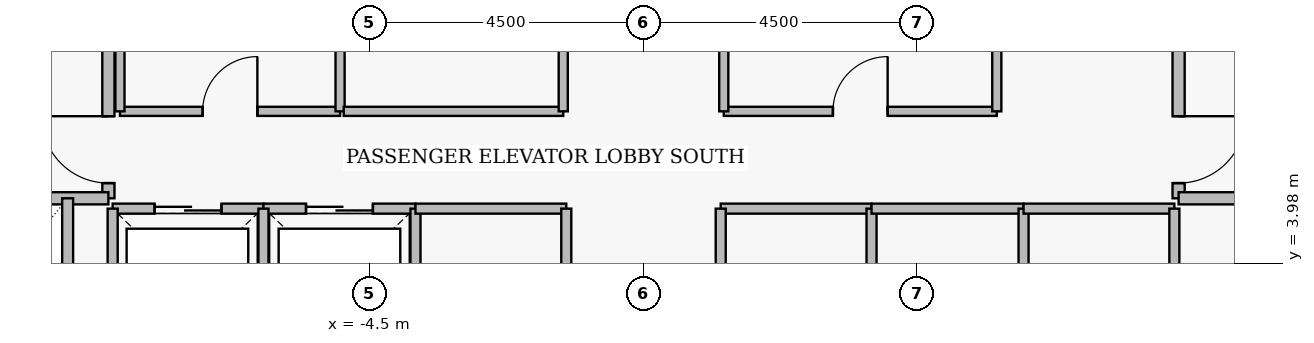
"""IFC4 building model, lengths in metres.
Left out: names, types, materials, properties, quantities, classifications, styles, units other than length and angle.
Written with IfcOpenShell. Run it as: python <this file> out.ifc"""

import sys

from ifc_helpers import new_model, si_unit, direction, frame, frame_2d, origin, place, context, subcontext, project, spatial, rectangle, extrude, element, fill, save


model = new_model("IFC4")
c1 = context("Model", 3, precision=1e-05, world=origin(), true_north=direction((0.0, 1.0)))
c2 = subcontext(c1, "Body", "Model", "MODEL_VIEW")
j1 = project(units=[si_unit("LENGTHUNIT", "METRE"), si_unit("PLANEANGLEUNIT", "RADIAN")], contexts=[c1])
p1 = place(None, origin())
s1 = spatial("IfcSite", under=j1, at=p1, CompositionType="ELEMENT")
p2 = place(p1, origin())
s2 = spatial("IfcBuilding", under=s1, at=p2, CompositionType="ELEMENT")
p3 = place(p2, frame((0.0, 0.0, -4.5)))
s3 = spatial("IfcBuildingStorey", under=s2, at=p3, CompositionType="ELEMENT", Elevation=-4.5)
p4 = place(p3, frame((-8.8, 5.05, 0.0), z_axis=(0.0, 0.0, 1.0), x_axis=(0.0, 1.0, 0.0)))
e1 = element("IfcWall", 1, at=p4, inside=s3, PredefinedType="PARTITIONING", context=c2, shape_type="SweptSolid", body=[
    extrude(rectangle(XDim=6.1, YDim=0.2, at=frame_2d((3.05, 0.0))), origin(), (0.0, 0.0, 1.0), 4.24),
])
p5 = place(p4, frame((0.25, 0.0, 0.0)))
e2 = element("IfcOpeningElement", 2, at=p5, cuts=e1, PredefinedType="OPENING", context=c2, shape_type="SweptSolid", body=[
    extrude(rectangle(XDim=1.1, YDim=2.2, at=frame_2d((0.55, 1.1))), frame((0.0, 0.11, 0.0), z_axis=(0.0, -1.0, 0.0), x_axis=(1.0, 0.0, 0.0)), (0.0, 0.0, 1.0), 0.22),
])
p6 = place(p4, frame((3.85, 0.0, 0.0)))
e3 = element("IfcOpeningElement", 3, at=p6, cuts=e1, PredefinedType="OPENING", context=c2, shape_type="SweptSolid", body=[
    extrude(rectangle(XDim=1.1, YDim=2.2, at=frame_2d((0.55, 1.1))), frame((0.0, 0.11, 0.0), z_axis=(0.0, -1.0, 0.0), x_axis=(1.0, 0.0, 0.0)), (0.0, 0.0, 1.0), 0.22),
])
p7 = place(p3, frame((8.8, 11.15, 0.0), z_axis=(0.0, 0.0, 1.0), x_axis=(0.0, -1.0, 0.0)))
e4 = element("IfcWall", 4, at=p7, inside=s3, PredefinedType="PARTITIONING", context=c2, shape_type="SweptSolid", body=[
    extrude(rectangle(XDim=6.1, YDim=0.2, at=frame_2d((3.05, 0.0))), origin(), (0.0, 0.0, 1.0), 4.24),
])
p8 = place(p7, frame((1.15, 0.0, 0.0)))
e5 = element("IfcOpeningElement", 5, at=p8, cuts=e4, PredefinedType="OPENING", context=c2, shape_type="SweptSolid", body=[
    extrude(rectangle(XDim=1.1, YDim=2.2, at=frame_2d((0.55, 1.1))), frame((0.0, 0.11, 0.0), z_axis=(0.0, -1.0, 0.0), x_axis=(1.0, 0.0, 0.0)), (0.0, 0.0, 1.0), 0.22),
])
p9 = place(p7, frame((4.75, 0.0, 0.0)))
e6 = element("IfcOpeningElement", 6, at=p9, cuts=e4, PredefinedType="OPENING", context=c2, shape_type="SweptSolid", body=[
    extrude(rectangle(XDim=1.1, YDim=2.2, at=frame_2d((0.55, 1.1))), frame((0.0, 0.11, 0.0), z_axis=(0.0, -1.0, 0.0), x_axis=(1.0, 0.0, 0.0)), (0.0, 0.0, 1.0), 0.22),
])
p10 = place(p3, frame((-8.73, 4.88, 0.0), z_axis=(0.0, 0.0, 1.0), x_axis=(1.0, 0.0, 0.0)))
e7 = element("IfcWall", 7, at=p10, inside=s3, PredefinedType="PARTITIONING", context=c2, shape_type="SweptSolid", body=[
    extrude(rectangle(XDim=2.48, YDim=0.165, at=frame_2d((1.24, 0.0))), origin(), (0.0, 0.0, 1.0), 4.24),
])
p11 = place(p10, frame((0.69, 0.0, 0.0)))
e8 = element("IfcOpeningElement", 8, at=p11, cuts=e7, PredefinedType="OPENING", context=c2, shape_type="SweptSolid", body=[
    extrude(rectangle(XDim=1.1, YDim=2.25, at=frame_2d((0.55, 1.125))), frame((0.0, 0.093, 0.0), z_axis=(0.0, -1.0, 0.0), x_axis=(1.0, 0.0, 0.0)), (0.0, 0.0, 1.0), 0.185),
])
p12 = place(p3, frame((-6.25, 4.88, 0.0), z_axis=(0.0, 0.0, 1.0), x_axis=(1.0, 0.0, 0.0)))
e9 = element("IfcWall", 9, at=p12, inside=s3, PredefinedType="PARTITIONING", context=c2, shape_type="SweptSolid", body=[
    extrude(rectangle(XDim=2.5, YDim=0.165, at=frame_2d((1.25, 0.0))), origin(), (0.0, 0.0, 1.0), 4.24),
])
p13 = place(p12, frame((0.7, 0.0, 0.0)))
e10 = element("IfcOpeningElement", 10, at=p13, cuts=e9, PredefinedType="OPENING", context=c2, shape_type="SweptSolid", body=[
    extrude(rectangle(XDim=1.1, YDim=2.25, at=frame_2d((0.55, 1.125))), frame((0.0, 0.093, 0.0), z_axis=(0.0, -1.0, 0.0), x_axis=(1.0, 0.0, 0.0)), (0.0, 0.0, 1.0), 0.185),
])
p14 = place(p3, frame((-8.61, 6.48, 0.0), z_axis=(0.0, 0.0, 1.0), x_axis=(1.0, 0.0, 0.0)))
e11 = element("IfcWall", 11, at=p14, inside=s3, PredefinedType="PARTITIONING", context=c2, shape_type="SweptSolid", body=[
    extrude(rectangle(XDim=3.62, YDim=0.15, at=frame_2d((1.81, 0.0))), origin(), (0.0, 0.0, 1.0), 4.24),
])
p15 = place(p14, frame((1.36, 0.0, 0.0)))
e12 = element("IfcOpeningElement", 12, at=p15, cuts=e11, PredefinedType="OPENING", context=c2, shape_type="SweptSolid", body=[
    extrude(rectangle(XDim=0.9, YDim=2.15, at=frame_2d((0.45, 1.075))), frame((0.0, 0.085, 0.0), z_axis=(0.0, -1.0, 0.0), x_axis=(1.0, 0.0, 0.0)), (0.0, 0.0, 1.0), 0.17),
])
p16 = place(p3, frame((1.32, 6.48, 0.0), z_axis=(0.0, 0.0, 1.0), x_axis=(1.0, 0.0, 0.0)))
e13 = element("IfcWall", 13, at=p16, inside=s3, PredefinedType="PARTITIONING", context=c2, shape_type="SweptSolid", body=[
    extrude(rectangle(XDim=4.49, YDim=0.15, at=frame_2d((2.245, 0.0))), origin(), (0.0, 0.0, 1.0), 4.24),
])
p17 = place(p16, frame((1.795, 0.0, 0.0)))
e14 = element("IfcOpeningElement", 14, at=p17, cuts=e13, PredefinedType="OPENING", context=c2, shape_type="SweptSolid", body=[
    extrude(rectangle(XDim=0.9, YDim=2.15, at=frame_2d((0.45, 1.075))), frame((0.0, 0.085, 0.0), z_axis=(0.0, -1.0, 0.0), x_axis=(1.0, 0.0, 0.0)), (0.0, 0.0, 1.0), 0.17),
])
for number, where, z_axis, x_axis in (
    (15, (-11.65, 5.05, 0.0), (0.0, 0.0, 1.0), (1.0, 0.0, 0.0)),
    (16, (8.8, 5.05, 0.0), (0.0, 0.0, 1.0), (1.0, 0.0, 0.0)),
):
    element("IfcWall", number, at=place(p3, frame(where, z_axis=z_axis, x_axis=x_axis)), inside=s3, PredefinedType="PARTITIONING", context=c2, shape_type="SweptSolid", body=[
        extrude(rectangle(XDim=2.85, YDim=0.2, at=frame_2d((1.425, 0.0))), origin(), (0.0, 0.0, 1.0), 4.24),
    ])
for number, where, z_axis, x_axis in (
    (17, (-8.73, 2.52, 0.0), (0.0, 0.0, 1.0), (0.0, 1.0, 0.0)),
    (18, (-6.25, 2.52, 0.0), (0.0, 0.0, 1.0), (0.0, 1.0, 0.0)),
    (19, (-3.75, 2.52, 0.0), (0.0, 0.0, 1.0), (0.0, 1.0, 0.0)),
):
    element("IfcWall", number, at=place(p3, frame(where, z_axis=z_axis, x_axis=x_axis)), inside=s3, PredefinedType="PARTITIONING", context=c2, shape_type="SweptSolid", body=[
        extrude(rectangle(XDim=2.36, YDim=0.165, at=frame_2d((1.18, 0.0))), origin(), (0.0, 0.0, 1.0), 4.24),
    ])
p18 = place(p3, frame((-3.75, 4.88, 0.0), z_axis=(0.0, 0.0, 1.0), x_axis=(1.0, 0.0, 0.0)))
e20 = element("IfcWall", 20, at=p18, inside=s3, PredefinedType="PARTITIONING", context=c2, shape_type="SweptSolid", body=[
    extrude(rectangle(XDim=2.48, YDim=0.165, at=frame_2d((1.24, 0.0))), origin(), (0.0, 0.0, 1.0), 4.24),
])
p19 = place(p3, frame((-1.27, 2.52, 0.0), z_axis=(0.0, 0.0, 1.0), x_axis=(0.0, 1.0, 0.0)))
e21 = element("IfcWall", 21, at=p19, inside=s3, PredefinedType="PARTITIONING", context=c2, shape_type="SweptSolid", body=[
    extrude(rectangle(XDim=2.36, YDim=0.165, at=frame_2d((1.18, 0.0))), origin(), (0.0, 0.0, 1.0), 4.24),
])
p20 = place(p3, frame((1.27, 4.88, 0.0), z_axis=(0.0, 0.0, 1.0), x_axis=(1.0, 0.0, 0.0)))
e22 = element("IfcWall", 22, at=p20, inside=s3, PredefinedType="PARTITIONING", context=c2, shape_type="SweptSolid", body=[
    extrude(rectangle(XDim=2.48, YDim=0.165, at=frame_2d((1.24, 0.0))), origin(), (0.0, 0.0, 1.0), 4.24),
])
for number, where, z_axis, x_axis in (
    (23, (1.27, 2.52, 0.0), (0.0, 0.0, 1.0), (0.0, 1.0, 0.0)),
    (24, (3.75, 2.52, 0.0), (0.0, 0.0, 1.0), (0.0, 1.0, 0.0)),
):
    element("IfcWall", number, at=place(p3, frame(where, z_axis=z_axis, x_axis=x_axis)), inside=s3, PredefinedType="PARTITIONING", context=c2, shape_type="SweptSolid", body=[
        extrude(rectangle(XDim=2.36, YDim=0.165, at=frame_2d((1.18, 0.0))), origin(), (0.0, 0.0, 1.0), 4.24),
    ])
p21 = place(p3, frame((3.75, 4.88, 0.0), z_axis=(0.0, 0.0, 1.0), x_axis=(1.0, 0.0, 0.0)))
e25 = element("IfcWall", 25, at=p21, inside=s3, PredefinedType="PARTITIONING", context=c2, shape_type="SweptSolid", body=[
    extrude(rectangle(XDim=2.5, YDim=0.165, at=frame_2d((1.25, 0.0))), origin(), (0.0, 0.0, 1.0), 4.24),
])
p22 = place(p3, frame((6.25, 2.52, 0.0), z_axis=(0.0, 0.0, 1.0), x_axis=(0.0, 1.0, 0.0)))
e26 = element("IfcWall", 26, at=p22, inside=s3, PredefinedType="PARTITIONING", context=c2, shape_type="SweptSolid", body=[
    extrude(rectangle(XDim=2.36, YDim=0.165, at=frame_2d((1.18, 0.0))), origin(), (0.0, 0.0, 1.0), 4.24),
])
p23 = place(p3, frame((6.25, 4.88, 0.0), z_axis=(0.0, 0.0, 1.0), x_axis=(1.0, 0.0, 0.0)))
e27 = element("IfcWall", 27, at=p23, inside=s3, PredefinedType="PARTITIONING", context=c2, shape_type="SweptSolid", body=[
    extrude(rectangle(XDim=2.48, YDim=0.165, at=frame_2d((1.24, 0.0))), origin(), (0.0, 0.0, 1.0), 4.24),
])
p24 = place(p3, frame((8.73, 2.52, 0.0), z_axis=(0.0, 0.0, 1.0), x_axis=(0.0, 1.0, 0.0)))
e28 = element("IfcWall", 28, at=p24, inside=s3, PredefinedType="PARTITIONING", context=c2, shape_type="SweptSolid", body=[
    extrude(rectangle(XDim=2.36, YDim=0.165, at=frame_2d((1.18, 0.0))), origin(), (0.0, 0.0, 1.0), 4.24),
])
p25 = place(p3, frame((-9.47, 2.45, 0.0), z_axis=(0.0, 0.0, 1.0), x_axis=(0.0, 1.0, 0.0)))
e29 = element("IfcWall", 29, at=p25, inside=s3, PredefinedType="PARTITIONING", context=c2, shape_type="SweptSolid", body=[
    extrude(rectangle(XDim=2.6, YDim=0.18, at=frame_2d((1.3, 0.0))), origin(), (0.0, 0.0, 1.0), 4.24),
])
for number, where, z_axis, x_axis in (
    (30, (-8.61, 6.48, 0.0), (0.0, 0.0, 1.0), (0.0, 1.0, 0.0)),
    (31, (-4.99, 6.48, 0.0), (0.0, 0.0, 1.0), (0.0, 1.0, 0.0)),
):
    element("IfcWall", number, at=place(p3, frame(where, z_axis=z_axis, x_axis=x_axis)), inside=s3, PredefinedType="PARTITIONING", context=c2, shape_type="SweptSolid", body=[
        extrude(rectangle(XDim=2.24, YDim=0.15, at=frame_2d((1.12, 0.0))), origin(), (0.0, 0.0, 1.0), 4.24),
    ])
p26 = place(p3, frame((-4.93, 6.48, 0.0), z_axis=(0.0, 0.0, 1.0), x_axis=(1.0, 0.0, 0.0)))
e32 = element("IfcWall", 32, at=p26, inside=s3, PredefinedType="PARTITIONING", context=c2, shape_type="SweptSolid", body=[
    extrude(rectangle(XDim=3.61, YDim=0.15, at=frame_2d((1.805, 0.0))), origin(), (0.0, 0.0, 1.0), 4.24),
])
for number, where, z_axis, x_axis in (
    (33, (-1.32, 6.48, 0.0), (0.0, 0.0, 1.0), (0.0, 1.0, 0.0)),
    (34, (1.32, 6.48, 0.0), (0.0, 0.0, 1.0), (0.0, 1.0, 0.0)),
    (35, (5.81, 6.48, 0.0), (0.0, 0.0, 1.0), (0.0, 1.0, 0.0)),
):
    element("IfcWall", number, at=place(p3, frame(where, z_axis=z_axis, x_axis=x_axis)), inside=s3, PredefinedType="PARTITIONING", context=c2, shape_type="SweptSolid", body=[
        extrude(rectangle(XDim=2.24, YDim=0.15, at=frame_2d((1.12, 0.0))), origin(), (0.0, 0.0, 1.0), 4.24),
    ])
p27 = place(p5, origin())
e36 = element("IfcDoor", 36, at=p27, inside=s3, OperationType="SINGLE_SWING_RIGHT", PredefinedType="DOOR", context=c2, shape_type="SweptSolid", body=[
    extrude(rectangle(XDim=1.1, YDim=2.2, at=frame_2d((0.55, 1.1))), frame((0.0, 0.025, 0.0), z_axis=(0.0, -1.0, 0.0), x_axis=(1.0, 0.0, 0.0)), (0.0, 0.0, 1.0), 0.05),
])
fill(e2, e36)
p28 = place(p9, origin())
e37 = element("IfcDoor", 37, at=p28, inside=s3, OperationType="SINGLE_SWING_LEFT", PredefinedType="DOOR", context=c2, shape_type="SweptSolid", body=[
    extrude(rectangle(XDim=1.1, YDim=2.2, at=frame_2d((0.55, 1.1))), frame((0.0, 0.025, 0.0), z_axis=(0.0, -1.0, 0.0), x_axis=(1.0, 0.0, 0.0)), (0.0, 0.0, 1.0), 0.05),
])
fill(e6, e37)
p29 = place(p11, origin())
e38 = element("IfcDoor", 38, at=p29, inside=s3, OperationType="SLIDING_TO_LEFT", PredefinedType="DOOR", context=c2, shape_type="SweptSolid", body=[
    extrude(rectangle(XDim=1.1, YDim=2.25, at=frame_2d((0.55, 1.125))), frame((0.0, 0.025, 0.0), z_axis=(0.0, -1.0, 0.0), x_axis=(1.0, 0.0, 0.0)), (0.0, 0.0, 1.0), 0.05),
])
fill(e8, e38)
p30 = place(p13, origin())
e39 = element("IfcDoor", 39, at=p30, inside=s3, OperationType="SLIDING_TO_LEFT", PredefinedType="DOOR", context=c2, shape_type="SweptSolid", body=[
    extrude(rectangle(XDim=1.1, YDim=2.25, at=frame_2d((0.55, 1.125))), frame((0.0, 0.025, 0.0), z_axis=(0.0, -1.0, 0.0), x_axis=(1.0, 0.0, 0.0)), (0.0, 0.0, 1.0), 0.05),
])
fill(e10, e39)
p31 = place(p15, origin())
e40 = element("IfcDoor", 40, at=p31, inside=s3, OperationType="SINGLE_SWING_RIGHT", PredefinedType="DOOR", context=c2, shape_type="SweptSolid", body=[
    extrude(rectangle(XDim=0.9, YDim=2.15, at=frame_2d((0.45, 1.075))), frame((0.0, 0.025, 0.0), z_axis=(0.0, -1.0, 0.0), x_axis=(1.0, 0.0, 0.0)), (0.0, 0.0, 1.0), 0.05),
])
fill(e12, e40)
p32 = place(p17, origin())
e41 = element("IfcDoor", 41, at=p32, inside=s3, OperationType="SINGLE_SWING_RIGHT", PredefinedType="DOOR", context=c2, shape_type="SweptSolid", body=[
    extrude(rectangle(XDim=0.9, YDim=2.15, at=frame_2d((0.45, 1.075))), frame((0.0, 0.025, 0.0), z_axis=(0.0, -1.0, 0.0), x_axis=(1.0, 0.0, 0.0)), (0.0, 0.0, 1.0), 0.05),
])
fill(e14, e41)
save(model, sys.argv[1])
